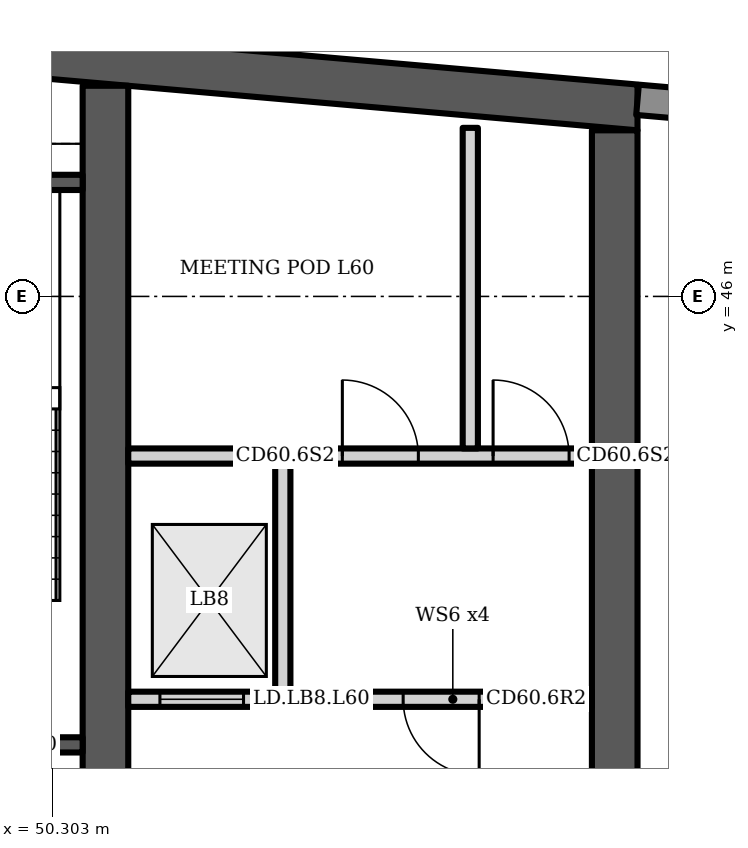
"""IFC4 building model, lengths in metres.
Left out: names, types, materials, properties, quantities, classifications, styles, units other than length and angle.
Written with IfcOpenShell. Run it as: python <this file> out.ifc"""

import sys

from ifc_helpers import new_model, si_unit, direction, frame, frame_2d, origin, place, context, subcontext, project, spatial, polyline, rectangle, outline, extrude, element, fill, save


model = new_model("IFC4")
c1 = context("Model", 3, precision=1e-05, world=origin(), true_north=direction((0.0, 1.0)))
c2 = subcontext(c1, "Body", "Model", "MODEL_VIEW")
j1 = project(units=[si_unit("LENGTHUNIT", "METRE"), si_unit("PLANEANGLEUNIT", "RADIAN")], contexts=[c1])
p1 = place(None, origin())
s1 = spatial("IfcSite", under=j1, at=p1, CompositionType="ELEMENT")
p2 = place(p1, origin())
s2 = spatial("IfcBuilding", under=s1, at=p2, CompositionType="ELEMENT")
p3 = place(p2, frame((0.0, 0.0, 239.5)))
s3 = spatial("IfcBuildingStorey", under=s2, at=p3, CompositionType="ELEMENT", Elevation=239.5)
p4 = place(p3, origin())
e1 = element("IfcWall", 1, at=p4, inside=s3, PredefinedType="SHEAR", context=c2, shape_type="SweptSolid", body=[
    extrude(outline(polyline([(23.0, 48.185), (40.5, 49.716), (58.0, 48.185), (58.0, 48.787), (40.5, 50.318), (23.0, 48.787), (23.0, 48.185)])), origin(), (0.0, 0.0, 1.0), 3.6),
])
p5 = place(p3, frame((51.0, 34.6, 0.0), z_axis=(0.0, 0.0, 1.0), x_axis=(0.0, 1.0, 0.0)))
e2 = element("IfcWall", 2, at=p5, inside=s3, PredefinedType="SHEAR", context=c2, shape_type="SweptSolid", body=[
    extrude(rectangle(XDim=14.171, YDim=0.6, at=frame_2d((7.085, 0.0))), origin(), (0.0, 0.0, 1.0), 3.6),
])
p6 = place(p5, frame((3.8, 0.0, 0.0)))
e3 = element("IfcOpeningElement", 3, at=p6, cuts=e2, PredefinedType="OPENING", context=c2, shape_type="SweptSolid", body=[
    extrude(rectangle(XDim=1.1, YDim=2.1, at=frame_2d((0.55, 1.05))), frame((0.0, 0.31, 0.0), z_axis=(0.0, -1.0, 0.0), x_axis=(1.0, 0.0, 0.0)), (0.0, 0.0, 1.0), 0.62),
])
p7 = place(p3, frame((57.7, 34.6, 0.0), z_axis=(0.0, 0.0, 1.0), x_axis=(0.0, 1.0, 0.0)))
e4 = element("IfcWall", 4, at=p7, inside=s3, PredefinedType="SHEAR", context=c2, shape_type="SweptSolid", body=[
    extrude(rectangle(XDim=13.585, YDim=0.6, at=frame_2d((6.792, 0.0))), origin(), (0.0, 0.0, 1.0), 3.6),
])
p8 = place(p3, frame((60.983, 48.326, 0.0), z_axis=(0.0, 0.0, 1.0), x_axis=(-0.996194, 0.087168, 0.0)))
e5 = element("IfcWall", 5, at=p8, inside=s3, PredefinedType="SOLIDWALL", context=c2, shape_type="SweptSolid", body=[
    extrude(rectangle(XDim=2.994, YDim=0.4, at=frame_2d((1.497, 0.0))), origin(), (0.0, 0.0, 1.0), 3.2),
])
p9 = place(p3, frame((44.3, 40.1, 0.0), z_axis=(0.0, 0.0, 1.0), x_axis=(1.0, 0.0, 0.0)))
e6 = element("IfcWall", 6, at=p9, inside=s3, PredefinedType="SHEAR", context=c2, shape_type="SweptSolid", body=[
    extrude(rectangle(XDim=6.4, YDim=0.2, at=frame_2d((3.2, 0.0))), origin(), (0.0, 0.0, 1.0), 3.2),
])
p10 = place(p9, frame((3.625, 0.0, 0.0)))
e7 = element("IfcOpeningElement", 7, at=p10, cuts=e6, PredefinedType="OPENING", context=c2, shape_type="SweptSolid", body=[
    extrude(rectangle(XDim=1.2, YDim=2.1, at=frame_2d((0.6, 1.05))), frame((0.0, 0.11, 0.0), z_axis=(0.0, -1.0, 0.0), x_axis=(1.0, 0.0, 0.0)), (0.0, 0.0, 1.0), 0.22),
])
p11 = place(p9, frame((0.625, 0.0, 0.0)))
e8 = element("IfcOpeningElement", 8, at=p11, cuts=e6, PredefinedType="OPENING", context=c2, shape_type="SweptSolid", body=[
    extrude(rectangle(XDim=0.9, YDim=2.1, at=frame_2d((0.45, 1.05))), frame((0.0, 0.11, 0.0), z_axis=(0.0, -1.0, 0.0), x_axis=(1.0, 0.0, 0.0)), (0.0, 0.0, 1.0), 0.22),
])
p12 = place(p3, frame((46.75, 47.5, 0.0), z_axis=(0.0, 0.0, 1.0), x_axis=(1.0, 0.0, 0.0)))
e9 = element("IfcWall", 9, at=p12, inside=s3, PredefinedType="SHEAR", context=c2, shape_type="SweptSolid", body=[
    extrude(rectangle(XDim=3.95, YDim=0.2, at=frame_2d((1.975, 0.0))), origin(), (0.0, 0.0, 1.0), 3.2),
])
p13 = place(p3, frame((51.3, 40.7, 0.0), z_axis=(0.0, 0.0, 1.0), x_axis=(1.0, 0.0, 0.0)))
e10 = element("IfcWall", 10, at=p13, inside=s3, PredefinedType="PARTITIONING", context=c2, shape_type="SweptSolid", body=[
    extrude(rectangle(XDim=6.1, YDim=0.2, at=frame_2d((3.05, 0.0))), origin(), (0.0, 0.0, 1.0), 3.2),
])
p14 = place(p13, frame((0.417, 0.0, 0.0)))
e11 = element("IfcOpeningElement", 11, at=p14, cuts=e10, PredefinedType="OPENING", context=c2, shape_type="SweptSolid", body=[
    extrude(rectangle(XDim=1.1, YDim=2.1, at=frame_2d((0.55, 1.05))), frame((0.0, 0.11, 0.0), z_axis=(0.0, -1.0, 0.0), x_axis=(1.0, 0.0, 0.0)), (0.0, 0.0, 1.0), 0.22),
])
p15 = place(p13, frame((3.617, 0.0, 0.0)))
e12 = element("IfcOpeningElement", 12, at=p15, cuts=e10, PredefinedType="OPENING", context=c2, shape_type="SweptSolid", body=[
    extrude(rectangle(XDim=1.0, YDim=2.1, at=frame_2d((0.5, 1.05))), frame((0.0, 0.11, 0.0), z_axis=(0.0, -1.0, 0.0), x_axis=(1.0, 0.0, 0.0)), (0.0, 0.0, 1.0), 0.22),
])
p16 = place(p3, frame((51.3, 43.9, 0.0), z_axis=(0.0, 0.0, 1.0), x_axis=(1.0, 0.0, 0.0)))
e13 = element("IfcWall", 13, at=p16, inside=s3, PredefinedType="PARTITIONING", context=c2, shape_type="SweptSolid", body=[
    extrude(rectangle(XDim=6.1, YDim=0.2, at=frame_2d((3.05, 0.0))), origin(), (0.0, 0.0, 1.0), 3.2),
])
p17 = place(p16, frame((2.817, 0.0, 0.0)))
e14 = element("IfcOpeningElement", 14, at=p17, cuts=e13, PredefinedType="OPENING", context=c2, shape_type="SweptSolid", body=[
    extrude(rectangle(XDim=1.0, YDim=2.1, at=frame_2d((0.5, 1.05))), frame((0.0, 0.11, 0.0), z_axis=(0.0, -1.0, 0.0), x_axis=(1.0, 0.0, 0.0)), (0.0, 0.0, 1.0), 0.22),
])
p18 = place(p16, frame((4.8, 0.0, 0.0)))
e15 = element("IfcOpeningElement", 15, at=p18, cuts=e13, PredefinedType="OPENING", context=c2, shape_type="SweptSolid", body=[
    extrude(rectangle(XDim=1.0, YDim=2.1, at=frame_2d((0.5, 1.05))), frame((0.0, 0.11, 0.0), z_axis=(0.0, -1.0, 0.0), x_axis=(1.0, 0.0, 0.0)), (0.0, 0.0, 1.0), 0.22),
])
p19 = place(p3, frame((0.0, 0.0, -0.0)))
e16 = element("IfcWall", 16, at=p19, inside=s3, PredefinedType="PARTITIONING", context=c2, shape_type="SweptSolid", body=[
    extrude(outline(polyline([(53.433, 40.8), (53.433, 43.8), (53.233, 43.8), (53.233, 40.8), (53.433, 40.8)])), origin(), (0.0, 0.0, 1.0), 3.2),
])
p20 = place(p3, frame((55.8, 44.0, 0.0), z_axis=(0.0, 0.0, 1.0), x_axis=(0.0, 1.0, 0.0)))
e17 = element("IfcWall", 17, at=p20, inside=s3, PredefinedType="PARTITIONING", context=c2, shape_type="SweptSolid", body=[
    extrude(rectangle(XDim=4.218, YDim=0.2, at=frame_2d((2.109, 0.0))), origin(), (0.0, 0.0, 1.0), 3.2),
])
p21 = place(p14, origin())
e18 = element("IfcDoor", 18, at=p21, inside=s3, OperationType="DOUBLE_DOOR_SLIDING", PredefinedType="DOOR", context=c2, shape_type="SweptSolid", body=[
    extrude(rectangle(XDim=1.1, YDim=2.1, at=frame_2d((0.55, 1.05))), frame((0.0, 0.025, 0.0), z_axis=(0.0, -1.0, 0.0), x_axis=(1.0, 0.0, 0.0)), (0.0, 0.0, 1.0), 0.05),
])
fill(e11, e18)
p22 = place(p15, origin())
e19 = element("IfcDoor", 19, at=p22, inside=s3, OperationType="SINGLE_SWING_RIGHT", PredefinedType="DOOR", context=c2, shape_type="SweptSolid", body=[
    extrude(rectangle(XDim=1.0, YDim=2.1, at=frame_2d((0.5, 1.05))), frame((0.0, 0.025, 0.0), z_axis=(0.0, -1.0, 0.0), x_axis=(1.0, 0.0, 0.0)), (0.0, 0.0, 1.0), 0.05),
])
fill(e12, e19)
p23 = place(p17, origin())
e20 = element("IfcDoor", 20, at=p23, inside=s3, OperationType="SINGLE_SWING_LEFT", PredefinedType="DOOR", context=c2, shape_type="SweptSolid", body=[
    extrude(rectangle(XDim=1.0, YDim=2.1, at=frame_2d((0.5, 1.05))), frame((0.0, 0.025, 0.0), z_axis=(0.0, -1.0, 0.0), x_axis=(1.0, 0.0, 0.0)), (0.0, 0.0, 1.0), 0.05),
])
fill(e14, e20)
p24 = place(p18, origin())
e21 = element("IfcDoor", 21, at=p24, inside=s3, OperationType="SINGLE_SWING_LEFT", PredefinedType="DOOR", context=c2, shape_type="SweptSolid", body=[
    extrude(rectangle(XDim=1.0, YDim=2.1, at=frame_2d((0.5, 1.05))), frame((0.0, 0.025, 0.0), z_axis=(0.0, -1.0, 0.0), x_axis=(1.0, 0.0, 0.0)), (0.0, 0.0, 1.0), 0.05),
])
fill(e15, e21)
save(model, sys.argv[1])
